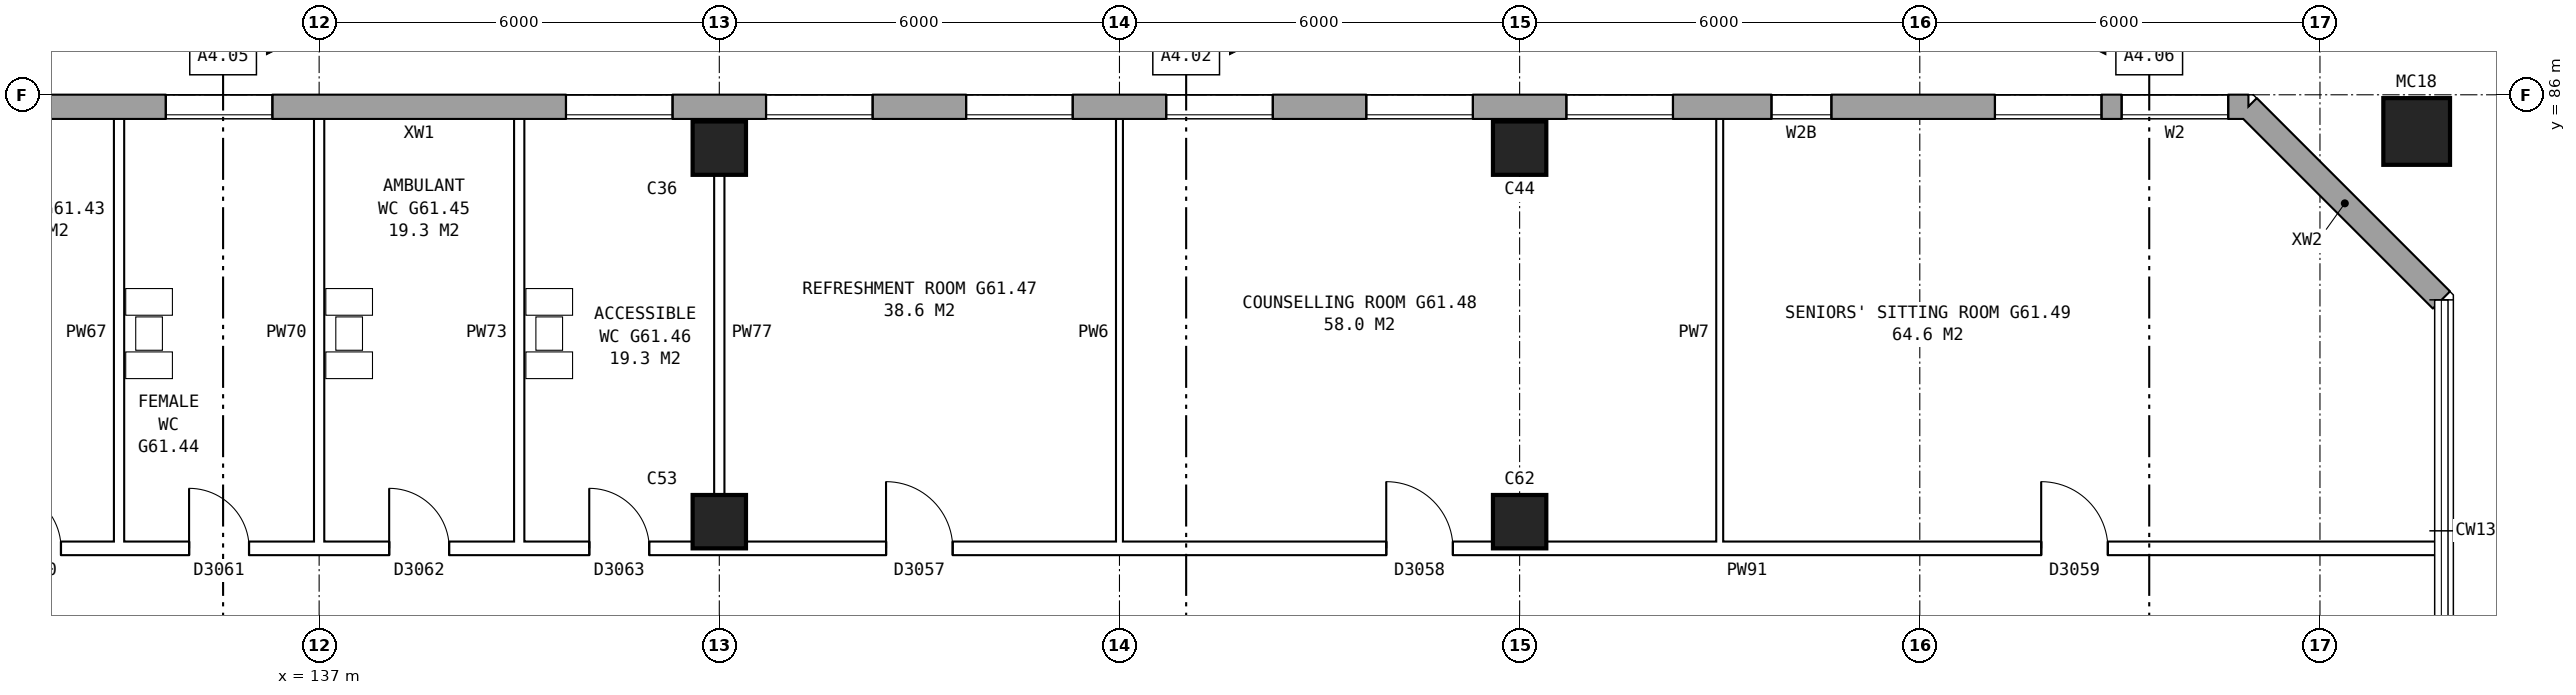
"""IFC4 building model, lengths in metres.
Left out: names, types, materials, properties, quantities, classifications, styles, units other than length and angle.
Written with IfcOpenShell. Run it as: python <this file> out.ifc"""

import sys

from ifc_helpers import new_model, si_unit, direction, frame, frame_2d, origin, origin_2d, place, context, subcontext, project, spatial, rectangle, hollow_rectangle, extrude, element, fill, save


model = new_model("IFC4")
c1 = context("Model", 3, precision=1e-05, world=origin(), true_north=direction((0.0, 1.0)))
c2 = subcontext(c1, "Body", "Model", "MODEL_VIEW")
j1 = project(units=[si_unit("LENGTHUNIT", "METRE"), si_unit("PLANEANGLEUNIT", "RADIAN")], contexts=[c1])
p1 = place(None, origin())
s1 = spatial("IfcSite", under=j1, at=p1, CompositionType="ELEMENT")
p2 = place(p1, origin())
s2 = spatial("IfcBuilding", under=s1, at=p2, CompositionType="ELEMENT")
p3 = place(p2, frame((0.0, 0.0, 215.2)))
s3 = spatial("IfcBuildingStorey", under=s2, at=p3, CompositionType="ELEMENT", Elevation=215.2)
for number, where, z_axis, x_axis in (
    (1, (143.0, 79.6, 0.0), (0.0, 0.0, 1.0), (1.0, 0.0, 0.0)),
    (2, (143.0, 85.2, 0.0), (0.0, 0.0, 1.0), (1.0, 0.0, 0.0)),
    (3, (155.0, 79.6, 0.0), (0.0, 0.0, 1.0), (1.0, 0.0, 0.0)),
    (4, (155.0, 85.2, 0.0), (0.0, 0.0, 1.0), (1.0, 0.0, 0.0)),
):
    element("IfcColumn", number, at=place(p3, frame(where, z_axis=z_axis, x_axis=x_axis)), inside=s3, PredefinedType="COLUMN", context=c2, shape_type="SweptSolid", body=[
        extrude(rectangle(XDim=0.8, YDim=0.8, at=origin_2d()), origin(), (0.0, 0.0, 1.0), 5.6),
    ])
p4 = place(p3, frame((168.45, 85.45, 0.0), z_axis=(0.0, 0.0, 1.0), x_axis=(1.0, 0.0, 0.0)))
e5 = element("IfcColumn", 5, at=p4, inside=s3, PredefinedType="COLUMN", context=c2, shape_type="SweptSolid", body=[
    extrude(hollow_rectangle(XDim=1.0, YDim=1.0, WallThickness=0.055, at=origin_2d()), origin(), (0.0, 0.0, 1.0), 6.2),
])
p5 = place(p3, frame((168.82, 82.925, 0.0), z_axis=(0.0, 0.0, 1.0), x_axis=(-0.707106781187, 0.707106781187, 0.0)))
e6 = element("IfcWall", 6, at=p5, inside=s3, PredefinedType="STANDARD", context=c2, shape_type="SweptSolid", body=[
    extrude(rectangle(XDim=4.094, YDim=0.36, at=frame_2d((2.047, 0.0))), origin(), (0.0, 0.0, 1.0), 5.6),
])
p6 = place(p3, frame((165.925, 85.82, 0.0), z_axis=(0.0, 0.0, 1.0), x_axis=(-1.0, 0.0, 0.0)))
e7 = element("IfcWall", 7, at=p6, inside=s3, PredefinedType="STANDARD", context=c2, shape_type="SweptSolid", body=[
    extrude(rectangle(XDim=33.875, YDim=0.36, at=frame_2d((16.938, 0.0))), origin(), (0.0, 0.0, 1.0), 5.6),
])
p7 = place(p6, frame((0.3, 0.0, 0.15)))
e8 = element("IfcOpeningElement", 8, at=p7, cuts=e7, PredefinedType="OPENING", context=c2, shape_type="SweptSolid", body=[
    extrude(rectangle(XDim=1.6, YDim=2.4, at=frame_2d((0.8, 1.2))), frame((0.0, 0.19, 0.0), z_axis=(0.0, -1.0, 0.0), x_axis=(1.0, 0.0, 0.0)), (0.0, 0.0, 1.0), 0.38),
])
p8 = place(p6, frame((2.2, 0.0, 0.15)))
e9 = element("IfcOpeningElement", 9, at=p8, cuts=e7, PredefinedType="OPENING", context=c2, shape_type="SweptSolid", body=[
    extrude(rectangle(XDim=1.6, YDim=2.4, at=frame_2d((0.8, 1.2))), frame((0.0, 0.19, 0.0), z_axis=(0.0, -1.0, 0.0), x_axis=(1.0, 0.0, 0.0)), (0.0, 0.0, 1.0), 0.38),
])
p9 = place(p6, frame((8.625, 0.0, 0.15)))
e10 = element("IfcOpeningElement", 10, at=p9, cuts=e7, PredefinedType="OPENING", context=c2, shape_type="SweptSolid", body=[
    extrude(rectangle(XDim=1.6, YDim=2.4, at=frame_2d((0.8, 1.2))), frame((0.0, 0.19, 0.0), z_axis=(0.0, -1.0, 0.0), x_axis=(1.0, 0.0, 0.0)), (0.0, 0.0, 1.0), 0.38),
])
p10 = place(p6, frame((11.625, 0.0, 0.15)))
e11 = element("IfcOpeningElement", 11, at=p10, cuts=e7, PredefinedType="OPENING", context=c2, shape_type="SweptSolid", body=[
    extrude(rectangle(XDim=1.6, YDim=2.4, at=frame_2d((0.8, 1.2))), frame((0.0, 0.19, 0.0), z_axis=(0.0, -1.0, 0.0), x_axis=(1.0, 0.0, 0.0)), (0.0, 0.0, 1.0), 0.38),
])
p11 = place(p6, frame((14.625, 0.0, 0.15)))
e12 = element("IfcOpeningElement", 12, at=p11, cuts=e7, PredefinedType="OPENING", context=c2, shape_type="SweptSolid", body=[
    extrude(rectangle(XDim=1.6, YDim=2.4, at=frame_2d((0.8, 1.2))), frame((0.0, 0.19, 0.0), z_axis=(0.0, -1.0, 0.0), x_axis=(1.0, 0.0, 0.0)), (0.0, 0.0, 1.0), 0.38),
])
p12 = place(p6, frame((17.625, 0.0, 0.15)))
e13 = element("IfcOpeningElement", 13, at=p12, cuts=e7, PredefinedType="OPENING", context=c2, shape_type="SweptSolid", body=[
    extrude(rectangle(XDim=1.6, YDim=2.4, at=frame_2d((0.8, 1.2))), frame((0.0, 0.19, 0.0), z_axis=(0.0, -1.0, 0.0), x_axis=(1.0, 0.0, 0.0)), (0.0, 0.0, 1.0), 0.38),
])
p13 = place(p6, frame((20.625, 0.0, 0.15)))
e14 = element("IfcOpeningElement", 14, at=p13, cuts=e7, PredefinedType="OPENING", context=c2, shape_type="SweptSolid", body=[
    extrude(rectangle(XDim=1.6, YDim=2.4, at=frame_2d((0.8, 1.2))), frame((0.0, 0.19, 0.0), z_axis=(0.0, -1.0, 0.0), x_axis=(1.0, 0.0, 0.0)), (0.0, 0.0, 1.0), 0.38),
])
p14 = place(p6, frame((23.625, 0.0, 0.15)))
e15 = element("IfcOpeningElement", 15, at=p14, cuts=e7, PredefinedType="OPENING", context=c2, shape_type="SweptSolid", body=[
    extrude(rectangle(XDim=1.6, YDim=2.4, at=frame_2d((0.8, 1.2))), frame((0.0, 0.19, 0.0), z_axis=(0.0, -1.0, 0.0), x_axis=(1.0, 0.0, 0.0)), (0.0, 0.0, 1.0), 0.38),
])
p15 = place(p6, frame((29.625, 0.0, 0.15)))
e16 = element("IfcOpeningElement", 16, at=p15, cuts=e7, PredefinedType="OPENING", context=c2, shape_type="SweptSolid", body=[
    extrude(rectangle(XDim=1.6, YDim=2.4, at=frame_2d((0.8, 1.2))), frame((0.0, 0.19, 0.0), z_axis=(0.0, -1.0, 0.0), x_axis=(1.0, 0.0, 0.0)), (0.0, 0.0, 1.0), 0.38),
])
p16 = place(p6, frame((6.25, 0.0, 0.15)))
e17 = element("IfcOpeningElement", 17, at=p16, cuts=e7, PredefinedType="OPENING", context=c2, shape_type="SweptSolid", body=[
    extrude(rectangle(XDim=0.9, YDim=2.4, at=frame_2d((0.45, 1.2))), frame((0.0, 0.19, 0.0), z_axis=(0.0, -1.0, 0.0), x_axis=(1.0, 0.0, 0.0)), (0.0, 0.0, 1.0), 0.38),
])
p17 = place(p3, frame((131.26, 79.2, 0.0), z_axis=(0.0, 0.0, 1.0), x_axis=(1.0, 0.0, 0.0)))
e18 = element("IfcWall", 18, at=p17, inside=s3, PredefinedType="PARTITIONING", context=c2, shape_type="SweptSolid", body=[
    extrude(rectangle(XDim=37.5, YDim=0.2, at=frame_2d((18.75, 0.0))), origin(), (0.0, 0.0, 1.0), 5.6),
])
p18 = place(p17, frame((0.97, 0.0, 0.0)))
e19 = element("IfcOpeningElement", 19, at=p18, cuts=e18, PredefinedType="OPENING", context=c2, shape_type="SweptSolid", body=[
    extrude(rectangle(XDim=0.9, YDim=2.1, at=frame_2d((0.45, 1.05))), frame((0.0, 0.11, 0.0), z_axis=(0.0, -1.0, 0.0), x_axis=(1.0, 0.0, 0.0)), (0.0, 0.0, 1.0), 0.22),
])
p19 = place(p17, frame((3.79, 0.0, 0.0)))
e20 = element("IfcOpeningElement", 20, at=p19, cuts=e18, PredefinedType="OPENING", context=c2, shape_type="SweptSolid", body=[
    extrude(rectangle(XDim=0.9, YDim=2.1, at=frame_2d((0.45, 1.05))), frame((0.0, 0.11, 0.0), z_axis=(0.0, -1.0, 0.0), x_axis=(1.0, 0.0, 0.0)), (0.0, 0.0, 1.0), 0.22),
])
p20 = place(p17, frame((6.79, 0.0, 0.0)))
e21 = element("IfcOpeningElement", 21, at=p20, cuts=e18, PredefinedType="OPENING", context=c2, shape_type="SweptSolid", body=[
    extrude(rectangle(XDim=0.9, YDim=2.1, at=frame_2d((0.45, 1.05))), frame((0.0, 0.11, 0.0), z_axis=(0.0, -1.0, 0.0), x_axis=(1.0, 0.0, 0.0)), (0.0, 0.0, 1.0), 0.22),
])
p21 = place(p17, frame((9.79, 0.0, 0.0)))
e22 = element("IfcOpeningElement", 22, at=p21, cuts=e18, PredefinedType="OPENING", context=c2, shape_type="SweptSolid", body=[
    extrude(rectangle(XDim=0.9, YDim=2.1, at=frame_2d((0.45, 1.05))), frame((0.0, 0.11, 0.0), z_axis=(0.0, -1.0, 0.0), x_axis=(1.0, 0.0, 0.0)), (0.0, 0.0, 1.0), 0.22),
])
p22 = place(p17, frame((14.24, 0.0, 0.0)))
e23 = element("IfcOpeningElement", 23, at=p22, cuts=e18, PredefinedType="OPENING", context=c2, shape_type="SweptSolid", body=[
    extrude(rectangle(XDim=1.0, YDim=2.1, at=frame_2d((0.5, 1.05))), frame((0.0, 0.11, 0.0), z_axis=(0.0, -1.0, 0.0), x_axis=(1.0, 0.0, 0.0)), (0.0, 0.0, 1.0), 0.22),
])
p23 = place(p17, frame((21.74, 0.0, 0.0)))
e24 = element("IfcOpeningElement", 24, at=p23, cuts=e18, PredefinedType="OPENING", context=c2, shape_type="SweptSolid", body=[
    extrude(rectangle(XDim=1.0, YDim=2.1, at=frame_2d((0.5, 1.05))), frame((0.0, 0.11, 0.0), z_axis=(0.0, -1.0, 0.0), x_axis=(1.0, 0.0, 0.0)), (0.0, 0.0, 1.0), 0.22),
])
p24 = place(p17, frame((31.56, 0.0, 0.0)))
e25 = element("IfcOpeningElement", 25, at=p24, cuts=e18, PredefinedType="OPENING", context=c2, shape_type="SweptSolid", body=[
    extrude(rectangle(XDim=1.0, YDim=2.1, at=frame_2d((0.5, 1.05))), frame((0.0, 0.11, 0.0), z_axis=(0.0, -1.0, 0.0), x_axis=(1.0, 0.0, 0.0)), (0.0, 0.0, 1.0), 0.22),
])
for number, where, z_axis, x_axis in (
    (26, (134.0, 79.1, 0.0), (0.0, 0.0, 1.0), (0.0, 1.0, 0.0)),
    (27, (137.0, 79.1, 0.0), (0.0, 0.0, 1.0), (0.0, 1.0, 0.0)),
    (28, (140.0, 79.1, 0.0), (0.0, 0.0, 1.0), (0.0, 1.0, 0.0)),
    (29, (143.0, 79.1, 0.0), (0.0, 0.0, 1.0), (0.0, 1.0, 0.0)),
):
    element("IfcWall", number, at=place(p3, frame(where, z_axis=z_axis, x_axis=x_axis)), inside=s3, PredefinedType="PLUMBINGWALL", context=c2, shape_type="SweptSolid", body=[
        extrude(rectangle(XDim=6.66, YDim=0.15, at=frame_2d((3.33, 0.0))), origin(), (0.0, 0.0, 1.0), 5.6),
    ])
for number, where, z_axis, x_axis in (
    (30, (149.0, 79.1, 0.0), (0.0, 0.0, 1.0), (0.0, 1.0, 0.0)),
    (31, (158.0, 79.1, 0.0), (0.0, 0.0, 1.0), (0.0, 1.0, 0.0)),
):
    element("IfcWall", number, at=place(p3, frame(where, z_axis=z_axis, x_axis=x_axis)), inside=s3, PredefinedType="PARTITIONING", context=c2, shape_type="SweptSolid", body=[
        extrude(rectangle(XDim=6.66, YDim=0.1, at=frame_2d((3.33, 0.0))), origin(), (0.0, 0.0, 1.0), 5.6),
    ])
p25 = place(p7, origin())
e32 = element("IfcWindow", 32, at=p25, inside=s3, PartitioningType="SINGLE_PANEL", PredefinedType="WINDOW", context=c2, shape_type="SweptSolid", body=[
    extrude(rectangle(XDim=1.6, YDim=2.4, at=frame_2d((0.8, 1.2))), frame((0.0, 0.15, 0.0), z_axis=(0.0, -1.0, 0.0), x_axis=(1.0, 0.0, 0.0)), (0.0, 0.0, 1.0), 0.06),
])
fill(e8, e32)
p26 = place(p8, origin())
e33 = element("IfcWindow", 33, at=p26, inside=s3, PartitioningType="SINGLE_PANEL", PredefinedType="WINDOW", context=c2, shape_type="SweptSolid", body=[
    extrude(rectangle(XDim=1.6, YDim=2.4, at=frame_2d((0.8, 1.2))), frame((0.0, 0.15, 0.0), z_axis=(0.0, -1.0, 0.0), x_axis=(1.0, 0.0, 0.0)), (0.0, 0.0, 1.0), 0.06),
])
fill(e9, e33)
p27 = place(p9, origin())
e34 = element("IfcWindow", 34, at=p27, inside=s3, PartitioningType="SINGLE_PANEL", PredefinedType="WINDOW", context=c2, shape_type="SweptSolid", body=[
    extrude(rectangle(XDim=1.6, YDim=2.4, at=frame_2d((0.8, 1.2))), frame((0.0, 0.15, 0.0), z_axis=(0.0, -1.0, 0.0), x_axis=(1.0, 0.0, 0.0)), (0.0, 0.0, 1.0), 0.06),
])
fill(e10, e34)
p28 = place(p10, origin())
e35 = element("IfcWindow", 35, at=p28, inside=s3, PartitioningType="SINGLE_PANEL", PredefinedType="WINDOW", context=c2, shape_type="SweptSolid", body=[
    extrude(rectangle(XDim=1.6, YDim=2.4, at=frame_2d((0.8, 1.2))), frame((0.0, 0.15, 0.0), z_axis=(0.0, -1.0, 0.0), x_axis=(1.0, 0.0, 0.0)), (0.0, 0.0, 1.0), 0.06),
])
fill(e11, e35)
p29 = place(p11, origin())
e36 = element("IfcWindow", 36, at=p29, inside=s3, PartitioningType="SINGLE_PANEL", PredefinedType="WINDOW", context=c2, shape_type="SweptSolid", body=[
    extrude(rectangle(XDim=1.6, YDim=2.4, at=frame_2d((0.8, 1.2))), frame((0.0, 0.15, 0.0), z_axis=(0.0, -1.0, 0.0), x_axis=(1.0, 0.0, 0.0)), (0.0, 0.0, 1.0), 0.06),
])
fill(e12, e36)
p30 = place(p12, origin())
e37 = element("IfcWindow", 37, at=p30, inside=s3, PartitioningType="SINGLE_PANEL", PredefinedType="WINDOW", context=c2, shape_type="SweptSolid", body=[
    extrude(rectangle(XDim=1.6, YDim=2.4, at=frame_2d((0.8, 1.2))), frame((0.0, 0.15, 0.0), z_axis=(0.0, -1.0, 0.0), x_axis=(1.0, 0.0, 0.0)), (0.0, 0.0, 1.0), 0.06),
])
fill(e13, e37)
p31 = place(p13, origin())
e38 = element("IfcWindow", 38, at=p31, inside=s3, PartitioningType="SINGLE_PANEL", PredefinedType="WINDOW", context=c2, shape_type="SweptSolid", body=[
    extrude(rectangle(XDim=1.6, YDim=2.4, at=frame_2d((0.8, 1.2))), frame((0.0, 0.15, 0.0), z_axis=(0.0, -1.0, 0.0), x_axis=(1.0, 0.0, 0.0)), (0.0, 0.0, 1.0), 0.06),
])
fill(e14, e38)
p32 = place(p14, origin())
e39 = element("IfcWindow", 39, at=p32, inside=s3, PartitioningType="SINGLE_PANEL", PredefinedType="WINDOW", context=c2, shape_type="SweptSolid", body=[
    extrude(rectangle(XDim=1.6, YDim=2.4, at=frame_2d((0.8, 1.2))), frame((0.0, 0.15, 0.0), z_axis=(0.0, -1.0, 0.0), x_axis=(1.0, 0.0, 0.0)), (0.0, 0.0, 1.0), 0.06),
])
fill(e15, e39)
p33 = place(p15, origin())
e40 = element("IfcWindow", 40, at=p33, inside=s3, PartitioningType="SINGLE_PANEL", PredefinedType="WINDOW", context=c2, shape_type="SweptSolid", body=[
    extrude(rectangle(XDim=1.6, YDim=2.4, at=frame_2d((0.8, 1.2))), frame((0.0, 0.15, 0.0), z_axis=(0.0, -1.0, 0.0), x_axis=(1.0, 0.0, 0.0)), (0.0, 0.0, 1.0), 0.06),
])
fill(e16, e40)
p34 = place(p18, origin())
e41 = element("IfcDoor", 41, at=p34, inside=s3, OperationType="SINGLE_SWING_LEFT", PredefinedType="DOOR", context=c2, shape_type="SweptSolid", body=[
    extrude(rectangle(XDim=0.9, YDim=2.1, at=frame_2d((0.45, 1.05))), frame((0.0, 0.025, 0.0), z_axis=(0.0, -1.0, 0.0), x_axis=(1.0, 0.0, 0.0)), (0.0, 0.0, 1.0), 0.05),
])
fill(e19, e41)
p35 = place(p19, origin())
e42 = element("IfcDoor", 42, at=p35, inside=s3, OperationType="SINGLE_SWING_LEFT", PredefinedType="DOOR", context=c2, shape_type="SweptSolid", body=[
    extrude(rectangle(XDim=0.9, YDim=2.1, at=frame_2d((0.45, 1.05))), frame((0.0, 0.025, 0.0), z_axis=(0.0, -1.0, 0.0), x_axis=(1.0, 0.0, 0.0)), (0.0, 0.0, 1.0), 0.05),
])
fill(e20, e42)
p36 = place(p20, origin())
e43 = element("IfcDoor", 43, at=p36, inside=s3, OperationType="SINGLE_SWING_LEFT", PredefinedType="DOOR", context=c2, shape_type="SweptSolid", body=[
    extrude(rectangle(XDim=0.9, YDim=2.1, at=frame_2d((0.45, 1.05))), frame((0.0, 0.025, 0.0), z_axis=(0.0, -1.0, 0.0), x_axis=(1.0, 0.0, 0.0)), (0.0, 0.0, 1.0), 0.05),
])
fill(e21, e43)
p37 = place(p21, origin())
e44 = element("IfcDoor", 44, at=p37, inside=s3, OperationType="SINGLE_SWING_LEFT", PredefinedType="DOOR", context=c2, shape_type="SweptSolid", body=[
    extrude(rectangle(XDim=0.9, YDim=2.1, at=frame_2d((0.45, 1.05))), frame((0.0, 0.025, 0.0), z_axis=(0.0, -1.0, 0.0), x_axis=(1.0, 0.0, 0.0)), (0.0, 0.0, 1.0), 0.05),
])
fill(e22, e44)
p38 = place(p22, origin())
e45 = element("IfcDoor", 45, at=p38, inside=s3, OperationType="SINGLE_SWING_LEFT", PredefinedType="DOOR", context=c2, shape_type="SweptSolid", body=[
    extrude(rectangle(XDim=1.0, YDim=2.1, at=frame_2d((0.5, 1.05))), frame((0.0, 0.025, 0.0), z_axis=(0.0, -1.0, 0.0), x_axis=(1.0, 0.0, 0.0)), (0.0, 0.0, 1.0), 0.05),
])
fill(e23, e45)
p39 = place(p23, origin())
e46 = element("IfcDoor", 46, at=p39, inside=s3, OperationType="SINGLE_SWING_LEFT", PredefinedType="DOOR", context=c2, shape_type="SweptSolid", body=[
    extrude(rectangle(XDim=1.0, YDim=2.1, at=frame_2d((0.5, 1.05))), frame((0.0, 0.025, 0.0), z_axis=(0.0, -1.0, 0.0), x_axis=(1.0, 0.0, 0.0)), (0.0, 0.0, 1.0), 0.05),
])
fill(e24, e46)
p40 = place(p24, origin())
e47 = element("IfcDoor", 47, at=p40, inside=s3, OperationType="SINGLE_SWING_LEFT", PredefinedType="DOOR", context=c2, shape_type="SweptSolid", body=[
    extrude(rectangle(XDim=1.0, YDim=2.1, at=frame_2d((0.5, 1.05))), frame((0.0, 0.025, 0.0), z_axis=(0.0, -1.0, 0.0), x_axis=(1.0, 0.0, 0.0)), (0.0, 0.0, 1.0), 0.05),
])
fill(e25, e47)
p41 = place(p16, origin())
e48 = element("IfcWindow", 48, at=p41, inside=s3, PartitioningType="SINGLE_PANEL", PredefinedType="WINDOW", context=c2, shape_type="SweptSolid", body=[
    extrude(rectangle(XDim=0.9, YDim=2.4, at=frame_2d((0.45, 1.2))), frame((0.0, 0.15, 0.0), z_axis=(0.0, -1.0, 0.0), x_axis=(1.0, 0.0, 0.0)), (0.0, 0.0, 1.0), 0.06),
])
fill(e17, e48)
save(model, sys.argv[1])
